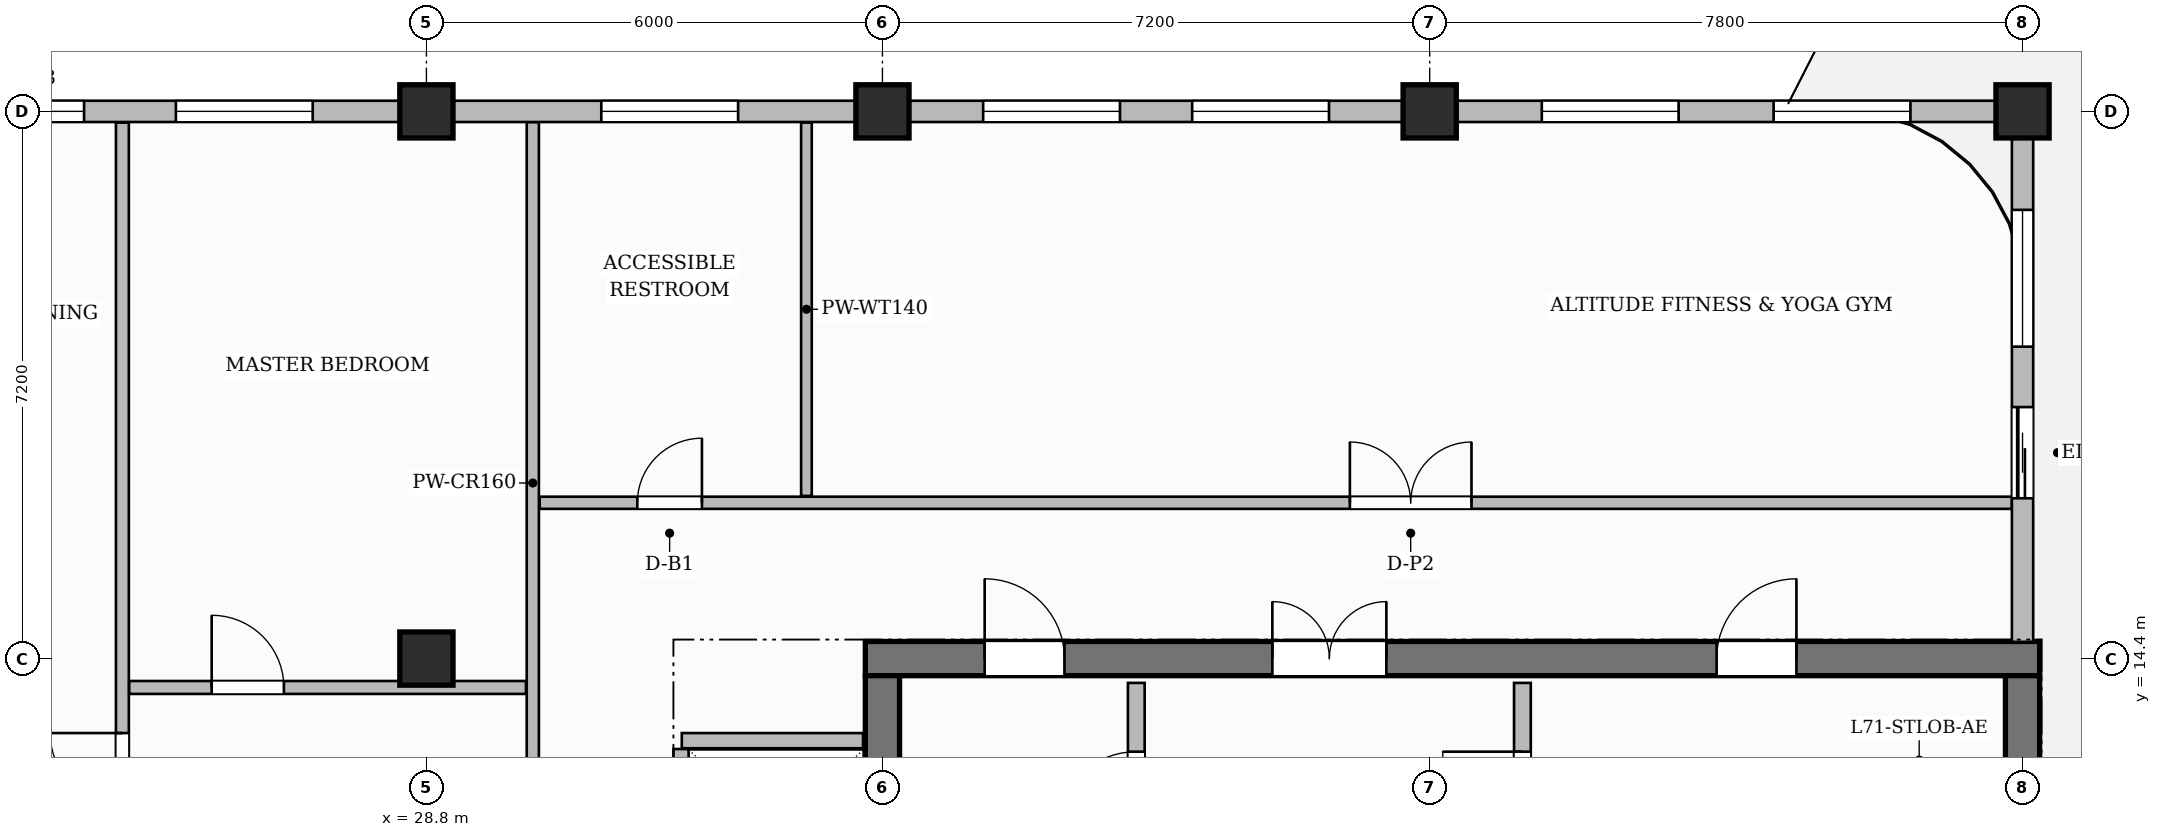
"""IFC4 building model, lengths in metres.
Left out: names, types, materials, properties, quantities, classifications, styles, units other than length and angle.
Written with IfcOpenShell. Run it as: python <this file> out.ifc"""

import sys

from ifc_helpers import new_model, si_unit, direction, frame, frame_2d, origin, origin_2d, place, context, subcontext, project, spatial, rectangle, extrude, source, transform, mapped, element, fill, save


model = new_model("IFC4")
c1 = context("Model", 3, precision=1e-05, world=origin(), true_north=direction((0.0, 1.0)))
c2 = subcontext(c1, "Body", "Model", "MODEL_VIEW")
j1 = project(units=[si_unit("LENGTHUNIT", "METRE"), si_unit("PLANEANGLEUNIT", "RADIAN")], contexts=[c1])
p1 = place(None, origin())
s1 = spatial("IfcSite", under=j1, at=p1, CompositionType="ELEMENT")
p2 = place(p1, origin())
s2 = spatial("IfcBuilding", under=s1, at=p2, CompositionType="ELEMENT")
p3 = place(p2, frame((0.0, 0.0, 282.75)))
s3 = spatial("IfcBuildingStorey", under=s2, at=p3, CompositionType="ELEMENT", Elevation=282.75)
p4 = place(p3, frame((34.575, 14.4, 0.0), z_axis=(0.0, 0.0, 1.0), x_axis=(1.0, 0.0, 0.0)))
e1 = element("IfcWall", 1, at=p4, inside=s3, PredefinedType="SHEAR", context=c2, shape_type="SweptSolid", body=[
    extrude(rectangle(XDim=15.45, YDim=0.45, at=frame_2d((7.725, 0.0))), origin(), (0.0, 0.0, 1.0), 3.85),
])
p5 = place(p4, frame((5.355, 0.0, 0.0)))
e2 = element("IfcOpeningElement", 2, at=p5, cuts=e1, PredefinedType="OPENING", context=c2, shape_type="SweptSolid", body=[
    extrude(rectangle(XDim=1.5, YDim=2.2, at=frame_2d((0.75, 1.1))), frame((0.0, 0.235, 0.0), z_axis=(0.0, -1.0, 0.0), x_axis=(1.0, 0.0, 0.0)), (0.0, 0.0, 1.0), 0.47),
])
p6 = place(p4, frame((1.57, 0.0, 0.0)))
e3 = element("IfcOpeningElement", 3, at=p6, cuts=e1, PredefinedType="OPENING", context=c2, shape_type="SweptSolid", body=[
    extrude(rectangle(XDim=1.05, YDim=2.15, at=frame_2d((0.525, 1.075))), frame((0.0, 0.235, 0.0), z_axis=(0.0, -1.0, 0.0), x_axis=(1.0, 0.0, 0.0)), (0.0, 0.0, 1.0), 0.47),
])
p7 = place(p4, frame((11.2, 0.0, 0.0)))
e4 = element("IfcOpeningElement", 4, at=p7, cuts=e1, PredefinedType="OPENING", context=c2, shape_type="SweptSolid", body=[
    extrude(rectangle(XDim=1.05, YDim=2.15, at=frame_2d((0.525, 1.075))), frame((0.0, 0.235, 0.0), z_axis=(0.0, -1.0, 0.0), x_axis=(1.0, 0.0, 0.0)), (0.0, 0.0, 1.0), 0.47),
])
for number, where, z_axis, x_axis in (
    (5, (34.8, 3.825, 0.0), (0.0, 0.0, 1.0), (0.0, 1.0, 0.0)),
    (6, (49.8, 3.825, 0.0), (0.0, 0.0, 1.0), (0.0, 1.0, 0.0)),
):
    element("IfcWall", number, at=place(p3, frame(where, z_axis=z_axis, x_axis=x_axis)), inside=s3, PredefinedType="SHEAR", context=c2, shape_type="SweptSolid", body=[
        extrude(rectangle(XDim=10.35, YDim=0.45, at=frame_2d((5.175, 0.0))), origin(), (0.0, 0.0, 1.0), 3.85),
    ])
m1 = source(origin(), c2, "Body", "SweptSolid", [
    extrude(rectangle(XDim=0.7, YDim=0.7, at=origin_2d()), origin(), (0.0, 0.0, 1.0), 3.85),
])
for number, where, z_axis, x_axis in (
    (7, (28.8, 14.4, 0.0), (0.0, 0.0, 1.0), (1.0, 0.0, 0.0)),
    (8, (28.8, 21.6, 0.0), (0.0, 0.0, 1.0), (1.0, 0.0, 0.0)),
    (9, (34.8, 21.6, 0.0), (0.0, 0.0, 1.0), (1.0, 0.0, 0.0)),
    (10, (42.0, 21.6, 0.0), (0.0, 0.0, 1.0), (1.0, 0.0, 0.0)),
    (11, (49.8, 21.6, 0.0), (0.0, 0.0, 1.0), (1.0, 0.0, 0.0)),
):
    element("IfcColumn", number, at=place(p3, frame(where, z_axis=z_axis, x_axis=x_axis)), inside=s3, PredefinedType="COLUMN", context=c2, shape_type="MappedRepresentation", body=[
        mapped(m1, transform((0.0, 0.0, 0.0), scale=1.0)),
    ])
p8 = place(p3, frame((38.14, 11.22, 0.0), z_axis=(0.0, 0.0, 1.0), x_axis=(0.0, 1.0, 0.0)))
e12 = element("IfcWall", 12, at=p8, inside=s3, PredefinedType="PARTITIONING", context=c2, shape_type="SweptSolid", body=[
    extrude(rectangle(XDim=2.86, YDim=0.22, at=frame_2d((1.43, 0.0))), origin(), (0.0, 0.0, 1.0), 3.6),
])
p9 = place(p8, frame((0.905, 0.0, 0.0)))
e13 = element("IfcOpeningElement", 13, at=p9, cuts=e12, PredefinedType="OPENING", context=c2, shape_type="SweptSolid", body=[
    extrude(rectangle(XDim=1.05, YDim=2.15, at=frame_2d((0.525, 1.075))), frame((0.0, 0.12, 0.0), z_axis=(0.0, -1.0, 0.0), x_axis=(1.0, 0.0, 0.0)), (0.0, 0.0, 1.0), 0.24),
])
p10 = place(p3, frame((43.22, 11.22, 0.0), z_axis=(0.0, 0.0, 1.0), x_axis=(0.0, 1.0, 0.0)))
e14 = element("IfcWall", 14, at=p10, inside=s3, PredefinedType="PARTITIONING", context=c2, shape_type="SweptSolid", body=[
    extrude(rectangle(XDim=2.86, YDim=0.22, at=frame_2d((1.43, 0.0))), origin(), (0.0, 0.0, 1.0), 3.6),
])
p11 = place(p10, frame((0.905, 0.0, 0.0)))
e15 = element("IfcOpeningElement", 15, at=p11, cuts=e14, PredefinedType="OPENING", context=c2, shape_type="SweptSolid", body=[
    extrude(rectangle(XDim=1.05, YDim=2.15, at=frame_2d((0.525, 1.075))), frame((0.0, 0.12, 0.0), z_axis=(0.0, -1.0, 0.0), x_axis=(1.0, 0.0, 0.0)), (0.0, 0.0, 1.0), 0.24),
])
p12 = place(p3, frame((32.16, 13.32, 0.0), z_axis=(0.0, 0.0, 1.0), x_axis=(1.0, 0.0, 0.0)))
e16 = element("IfcWall", 16, at=p12, inside=s3, PredefinedType="PARTITIONING", context=c2, shape_type="SweptSolid", body=[
    extrude(rectangle(XDim=2.385, YDim=0.2, at=frame_2d((1.192, 0.0))), origin(), (0.0, 0.0, 1.0), 3.6),
])
p13 = place(p3, frame((32.15, 4.39, 0.0), z_axis=(0.0, 0.0, 1.0), x_axis=(0.0, 1.0, 0.0)))
e17 = element("IfcWall", 17, at=p13, inside=s3, PredefinedType="PARTITIONING", context=c2, shape_type="SweptSolid", body=[
    extrude(rectangle(XDim=8.82, YDim=0.2, at=frame_2d((4.41, 0.0))), origin(), (0.0, 0.0, 1.0), 3.6),
])
p14 = place(p13, frame((0.5, 0.0, 0.0)))
e18 = element("IfcOpeningElement", 18, at=p14, cuts=e17, PredefinedType="OPENING", context=c2, shape_type="SweptSolid", body=[
    extrude(rectangle(XDim=1.1, YDim=2.2, at=frame_2d((0.55, 1.1))), frame((0.0, 0.11, 0.0), z_axis=(0.0, -1.0, 0.0), x_axis=(1.0, 0.0, 0.0)), (0.0, 0.0, 1.0), 0.22),
])
p15 = place(p13, frame((2.74, 0.0, 0.0)))
e19 = element("IfcOpeningElement", 19, at=p15, cuts=e17, PredefinedType="OPENING", context=c2, shape_type="SweptSolid", body=[
    extrude(rectangle(XDim=1.1, YDim=2.2, at=frame_2d((0.55, 1.1))), frame((0.0, 0.11, 0.0), z_axis=(0.0, -1.0, 0.0), x_axis=(1.0, 0.0, 0.0)), (0.0, 0.0, 1.0), 0.22),
])
p16 = place(p13, frame((4.98, 0.0, 0.0)))
e20 = element("IfcOpeningElement", 20, at=p16, cuts=e17, PredefinedType="OPENING", context=c2, shape_type="SweptSolid", body=[
    extrude(rectangle(XDim=1.1, YDim=2.2, at=frame_2d((0.55, 1.1))), frame((0.0, 0.11, 0.0), z_axis=(0.0, -1.0, 0.0), x_axis=(1.0, 0.0, 0.0)), (0.0, 0.0, 1.0), 0.22),
])
p17 = place(p13, frame((7.22, 0.0, 0.0)))
e21 = element("IfcOpeningElement", 21, at=p17, cuts=e17, PredefinedType="OPENING", context=c2, shape_type="SweptSolid", body=[
    extrude(rectangle(XDim=1.1, YDim=2.2, at=frame_2d((0.55, 1.1))), frame((0.0, 0.11, 0.0), z_axis=(0.0, -1.0, 0.0), x_axis=(1.0, 0.0, 0.0)), (0.0, 0.0, 1.0), 0.22),
])
p18 = place(p3, frame((30.2, 11.96, 0.0), z_axis=(0.0, 0.0, 1.0), x_axis=(0.0, 1.0, 0.0)))
e22 = element("IfcWall", 22, at=p18, inside=s3, PredefinedType="PARTITIONING", context=c2, shape_type="SweptSolid", body=[
    extrude(rectangle(XDim=9.5, YDim=0.16, at=frame_2d((4.75, 0.0))), origin(), (0.0, 0.0, 1.0), 3.6),
])
p19 = place(p3, frame((30.29, 16.45, 0.0), z_axis=(0.0, 0.0, 1.0), x_axis=(1.0, 0.0, 0.0)))
e23 = element("IfcWall", 23, at=p19, inside=s3, PredefinedType="PARTITIONING", context=c2, shape_type="SweptSolid", body=[
    extrude(rectangle(XDim=19.37, YDim=0.16, at=frame_2d((9.685, 0.0))), origin(), (0.0, 0.0, 1.0), 3.6),
])
p20 = place(p19, frame((1.285, 0.0, 0.0)))
e24 = element("IfcOpeningElement", 24, at=p20, cuts=e23, PredefinedType="OPENING", context=c2, shape_type="SweptSolid", body=[
    extrude(rectangle(XDim=0.85, YDim=2.1, at=frame_2d((0.425, 1.05))), frame((0.0, 0.09, 0.0), z_axis=(0.0, -1.0, 0.0), x_axis=(1.0, 0.0, 0.0)), (0.0, 0.0, 1.0), 0.18),
])
p21 = place(p19, frame((10.66, 0.0, 0.0)))
e25 = element("IfcOpeningElement", 25, at=p21, cuts=e23, PredefinedType="OPENING", context=c2, shape_type="SweptSolid", body=[
    extrude(rectangle(XDim=1.6, YDim=2.4, at=frame_2d((0.8, 1.2))), frame((0.0, 0.09, 0.0), z_axis=(0.0, -1.0, 0.0), x_axis=(1.0, 0.0, 0.0)), (0.0, 0.0, 1.0), 0.18),
])
p22 = place(p3, frame((33.8, 16.54, 0.0), z_axis=(0.0, 0.0, 1.0), x_axis=(0.0, 1.0, 0.0)))
e26 = element("IfcWall", 26, at=p22, inside=s3, PredefinedType="PARTITIONING", context=c2, shape_type="SweptSolid", body=[
    extrude(rectangle(XDim=4.912, YDim=0.14, at=frame_2d((2.456, 0.0))), origin(), (0.0, 0.0, 1.0), 3.6),
])
p23 = place(p3, frame((24.8, 11.96, 0.0), z_axis=(0.0, 0.0, 1.0), x_axis=(0.0, 1.0, 0.0)))
e27 = element("IfcWall", 27, at=p23, inside=s3, PredefinedType="PARTITIONING", context=c2, shape_type="SweptSolid", body=[
    extrude(rectangle(XDim=9.492, YDim=0.17, at=frame_2d((4.746, 0.0))), origin(), (0.0, 0.0, 1.0), 3.6),
])
p24 = place(p23, frame((0.51, 0.0, 0.0)))
e28 = element("IfcOpeningElement", 28, at=p24, cuts=e27, PredefinedType="OPENING", context=c2, shape_type="SweptSolid", body=[
    extrude(rectangle(XDim=0.95, YDim=2.15, at=frame_2d((0.475, 1.075))), frame((0.0, 0.095, 0.0), z_axis=(0.0, -1.0, 0.0), x_axis=(1.0, 0.0, 0.0)), (0.0, 0.0, 1.0), 0.19),
])
p25 = place(p3, frame((24.89, 14.02, 0.0), z_axis=(0.0, 0.0, 1.0), x_axis=(1.0, 0.0, 0.0)))
e29 = element("IfcWall", 29, at=p25, inside=s3, PredefinedType="PARTITIONING", context=c2, shape_type="SweptSolid", body=[
    extrude(rectangle(XDim=5.22, YDim=0.17, at=frame_2d((2.61, 0.0))), origin(), (0.0, 0.0, 1.0), 3.6),
])
p26 = place(p25, frame((1.085, 0.0, 0.0)))
e30 = element("IfcOpeningElement", 30, at=p26, cuts=e29, PredefinedType="OPENING", context=c2, shape_type="SweptSolid", body=[
    extrude(rectangle(XDim=0.95, YDim=2.15, at=frame_2d((0.475, 1.075))), frame((0.0, 0.095, 0.0), z_axis=(0.0, -1.0, 0.0), x_axis=(1.0, 0.0, 0.0)), (0.0, 0.0, 1.0), 0.19),
])
p27 = place(p3, frame((49.8, 14.62, 0.0), z_axis=(0.0, 0.0, 1.0), x_axis=(0.0, 1.0, 0.0)))
e31 = element("IfcWall", 31, at=p27, inside=s3, PredefinedType="SOLIDWALL", context=c2, shape_type="SweptSolid", body=[
    extrude(rectangle(XDim=6.93, YDim=0.28, at=frame_2d((3.465, 0.0))), origin(), (0.0, 0.0, 1.0), 3.185),
])
p28 = place(p27, frame((1.889, 0.0, 0.0)))
e32 = element("IfcOpeningElement", 32, at=p28, cuts=e31, PredefinedType="OPENING", context=c2, shape_type="SweptSolid", body=[
    extrude(rectangle(XDim=1.2, YDim=2.2, at=frame_2d((0.6, 1.1))), frame((0.0, 0.15, 0.0), z_axis=(0.0, -1.0, 0.0), x_axis=(1.0, 0.0, 0.0)), (0.0, 0.0, 1.0), 0.3),
])
p29 = place(p27, frame((3.884, 0.0, 0.8)))
e33 = element("IfcOpeningElement", 33, at=p29, cuts=e31, PredefinedType="OPENING", context=c2, shape_type="SweptSolid", body=[
    extrude(rectangle(XDim=1.8, YDim=1.85, at=frame_2d((0.9, 0.925))), frame((0.0, 0.15, 0.0), z_axis=(0.0, -1.0, 0.0), x_axis=(1.0, 0.0, 0.0)), (0.0, 0.0, 1.0), 0.3),
])
p30 = place(p3, frame((18.0, 21.6, 0.0), z_axis=(0.0, 0.0, 1.0), x_axis=(1.0, 0.0, 0.0)))
e34 = element("IfcWall", 34, at=p30, inside=s3, PredefinedType="SOLIDWALL", context=c2, shape_type="SweptSolid", body=[
    extrude(rectangle(XDim=31.8, YDim=0.28, at=frame_2d((15.9, 0.0))), origin(), (0.0, 0.0, 1.0), 3.185),
])
p31 = place(p30, frame((0.42, 0.0, 0.0)))
e35 = element("IfcOpeningElement", 35, at=p31, cuts=e34, PredefinedType="OPENING", context=c2, shape_type="SweptSolid", body=[
    extrude(rectangle(XDim=1.2, YDim=2.2, at=frame_2d((0.6, 1.1))), frame((0.0, 0.15, 0.0), z_axis=(0.0, -1.0, 0.0), x_axis=(1.0, 0.0, 0.0)), (0.0, 0.0, 1.0), 0.3),
])
p32 = place(p30, frame((4.896, 0.0, 0.8)))
e36 = element("IfcOpeningElement", 36, at=p32, cuts=e34, PredefinedType="OPENING", context=c2, shape_type="SweptSolid", body=[
    extrude(rectangle(XDim=1.4, YDim=1.85, at=frame_2d((0.7, 0.925))), frame((0.0, 0.15, 0.0), z_axis=(0.0, -1.0, 0.0), x_axis=(1.0, 0.0, 0.0)), (0.0, 0.0, 1.0), 0.3),
])
p33 = place(p30, frame((7.504, 0.0, 0.8)))
e37 = element("IfcOpeningElement", 37, at=p33, cuts=e34, PredefinedType="OPENING", context=c2, shape_type="SweptSolid", body=[
    extrude(rectangle(XDim=1.8, YDim=1.85, at=frame_2d((0.9, 0.925))), frame((0.0, 0.15, 0.0), z_axis=(0.0, -1.0, 0.0), x_axis=(1.0, 0.0, 0.0)), (0.0, 0.0, 1.0), 0.3),
])
p34 = place(p30, frame((13.101, 0.0, 0.8)))
e38 = element("IfcOpeningElement", 38, at=p34, cuts=e34, PredefinedType="OPENING", context=c2, shape_type="SweptSolid", body=[
    extrude(rectangle(XDim=1.8, YDim=1.85, at=frame_2d((0.9, 0.925))), frame((0.0, 0.15, 0.0), z_axis=(0.0, -1.0, 0.0), x_axis=(1.0, 0.0, 0.0)), (0.0, 0.0, 1.0), 0.3),
])
p35 = place(p30, frame((18.125, 0.0, 0.8)))
e39 = element("IfcOpeningElement", 39, at=p35, cuts=e34, PredefinedType="OPENING", context=c2, shape_type="SweptSolid", body=[
    extrude(rectangle(XDim=1.8, YDim=1.85, at=frame_2d((0.9, 0.925))), frame((0.0, 0.15, 0.0), z_axis=(0.0, -1.0, 0.0), x_axis=(1.0, 0.0, 0.0)), (0.0, 0.0, 1.0), 0.3),
])
p36 = place(p30, frame((20.875, 0.0, 0.8)))
e40 = element("IfcOpeningElement", 40, at=p36, cuts=e34, PredefinedType="OPENING", context=c2, shape_type="SweptSolid", body=[
    extrude(rectangle(XDim=1.8, YDim=1.85, at=frame_2d((0.9, 0.925))), frame((0.0, 0.15, 0.0), z_axis=(0.0, -1.0, 0.0), x_axis=(1.0, 0.0, 0.0)), (0.0, 0.0, 1.0), 0.3),
])
p37 = place(p30, frame((25.475, 0.0, 0.8)))
e41 = element("IfcOpeningElement", 41, at=p37, cuts=e34, PredefinedType="OPENING", context=c2, shape_type="SweptSolid", body=[
    extrude(rectangle(XDim=1.8, YDim=1.85, at=frame_2d((0.9, 0.925))), frame((0.0, 0.15, 0.0), z_axis=(0.0, -1.0, 0.0), x_axis=(1.0, 0.0, 0.0)), (0.0, 0.0, 1.0), 0.3),
])
p38 = place(p30, frame((28.525, 0.0, 0.8)))
e42 = element("IfcOpeningElement", 42, at=p38, cuts=e34, PredefinedType="OPENING", context=c2, shape_type="SweptSolid", body=[
    extrude(rectangle(XDim=1.8, YDim=1.85, at=frame_2d((0.9, 0.925))), frame((0.0, 0.15, 0.0), z_axis=(0.0, -1.0, 0.0), x_axis=(1.0, 0.0, 0.0)), (0.0, 0.0, 1.0), 0.3),
])
m2 = source(origin(), c2, "Body", "SweptSolid", [
    extrude(rectangle(XDim=1.05, YDim=2.15, at=frame_2d((0.525, 1.075))), frame((0.0, 0.025, 0.0), z_axis=(0.0, -1.0, 0.0), x_axis=(1.0, 0.0, 0.0)), (0.0, 0.0, 1.0), 0.05),
])
p39 = place(p9, origin())
e43 = element("IfcDoor", 43, at=p39, inside=s3, OperationType="SINGLE_SWING_LEFT", PredefinedType="DOOR", context=c2, shape_type="MappedRepresentation", body=[
    mapped(m2, transform((0.0, 0.0, 0.0), scale=1.0)),
])
fill(e13, e43)
p40 = place(p11, origin())
e44 = element("IfcDoor", 44, at=p40, inside=s3, OperationType="SINGLE_SWING_RIGHT", PredefinedType="DOOR", context=c2, shape_type="MappedRepresentation", body=[
    mapped(m2, transform((0.0, 0.0, 0.0), scale=1.0)),
])
fill(e15, e44)
m3 = source(origin(), c2, "Body", "SweptSolid", [
    extrude(rectangle(XDim=1.5, YDim=2.2, at=frame_2d((0.75, 1.1))), frame((0.0, 0.025, 0.0), z_axis=(0.0, -1.0, 0.0), x_axis=(1.0, 0.0, 0.0)), (0.0, 0.0, 1.0), 0.05),
])
p41 = place(p5, origin())
e45 = element("IfcDoor", 45, at=p41, inside=s3, OperationType="DOUBLE_DOOR_SINGLE_SWING", PredefinedType="DOOR", context=c2, shape_type="MappedRepresentation", body=[
    mapped(m3, transform((0.0, 0.0, 0.0), scale=1.0)),
])
fill(e2, e45)
p42 = place(p6, origin())
e46 = element("IfcDoor", 46, at=p42, inside=s3, OperationType="SINGLE_SWING_LEFT", PredefinedType="DOOR", context=c2, shape_type="MappedRepresentation", body=[
    mapped(m2, transform((0.0, 0.0, 0.0), scale=1.0)),
])
fill(e3, e46)
p43 = place(p7, origin())
e47 = element("IfcDoor", 47, at=p43, inside=s3, OperationType="SINGLE_SWING_RIGHT", PredefinedType="DOOR", context=c2, shape_type="MappedRepresentation", body=[
    mapped(m2, transform((0.0, 0.0, 0.0), scale=1.0)),
])
fill(e4, e47)
m4 = source(origin(), c2, "Body", "SweptSolid", [
    extrude(rectangle(XDim=0.85, YDim=2.1, at=frame_2d((0.425, 1.05))), frame((0.0, 0.025, 0.0), z_axis=(0.0, -1.0, 0.0), x_axis=(1.0, 0.0, 0.0)), (0.0, 0.0, 1.0), 0.05),
])
p44 = place(p20, origin())
e48 = element("IfcDoor", 48, at=p44, inside=s3, OperationType="SINGLE_SWING_RIGHT", PredefinedType="DOOR", context=c2, shape_type="MappedRepresentation", body=[
    mapped(m4, transform((0.0, 0.0, 0.0), scale=1.0)),
])
fill(e24, e48)
m5 = source(origin(), c2, "Body", "SweptSolid", [
    extrude(rectangle(XDim=1.6, YDim=2.4, at=frame_2d((0.8, 1.2))), frame((0.0, 0.025, 0.0), z_axis=(0.0, -1.0, 0.0), x_axis=(1.0, 0.0, 0.0)), (0.0, 0.0, 1.0), 0.05),
])
p45 = place(p21, origin())
e49 = element("IfcDoor", 49, at=p45, inside=s3, OperationType="DOUBLE_DOOR_SINGLE_SWING", PredefinedType="DOOR", context=c2, shape_type="MappedRepresentation", body=[
    mapped(m5, transform((0.0, 0.0, 0.0), scale=1.0)),
])
fill(e25, e49)
m6 = source(origin(), c2, "Body", "SweptSolid", [
    extrude(rectangle(XDim=0.95, YDim=2.15, at=frame_2d((0.475, 1.075))), frame((0.0, 0.025, 0.0), z_axis=(0.0, -1.0, 0.0), x_axis=(1.0, 0.0, 0.0)), (0.0, 0.0, 1.0), 0.05),
])
p46 = place(p24, origin())
e50 = element("IfcDoor", 50, at=p46, inside=s3, OperationType="SINGLE_SWING_RIGHT", PredefinedType="DOOR", context=c2, shape_type="MappedRepresentation", body=[
    mapped(m6, transform((0.0, 0.0, 0.0), scale=1.0)),
])
fill(e28, e50)
p47 = place(p26, origin())
e51 = element("IfcDoor", 51, at=p47, inside=s3, OperationType="SINGLE_SWING_LEFT", PredefinedType="DOOR", context=c2, shape_type="MappedRepresentation", body=[
    mapped(m6, transform((0.0, 0.0, 0.0), scale=1.0)),
])
fill(e30, e51)
m7 = source(origin(), c2, "Body", "SweptSolid", [
    extrude(rectangle(XDim=1.2, YDim=2.2, at=frame_2d((0.6, 1.1))), frame((0.0, 0.025, 0.0), z_axis=(0.0, -1.0, 0.0), x_axis=(1.0, 0.0, 0.0)), (0.0, 0.0, 1.0), 0.05),
])
p48 = place(p28, origin())
e52 = element("IfcDoor", 52, at=p48, inside=s3, OperationType="SLIDING_TO_LEFT", PredefinedType="DOOR", context=c2, shape_type="MappedRepresentation", body=[
    mapped(m7, transform((0.0, 0.0, 0.0), scale=1.0)),
])
fill(e32, e52)
m8 = source(origin(), c2, "Body", "SweptSolid", [
    extrude(rectangle(XDim=1.8, YDim=1.85, at=frame_2d((0.9, 0.925))), frame((0.0, 0.03, 0.0), z_axis=(0.0, -1.0, 0.0), x_axis=(1.0, 0.0, 0.0)), (0.0, 0.0, 1.0), 0.06),
])
p49 = place(p29, origin())
e53 = element("IfcWindow", 53, at=p49, inside=s3, PartitioningType="DOUBLE_PANEL_VERTICAL", PredefinedType="WINDOW", context=c2, shape_type="MappedRepresentation", body=[
    mapped(m8, transform((0.0, 0.0, 0.0), scale=1.0)),
])
fill(e33, e53)
m9 = source(origin(), c2, "Body", "SweptSolid", [
    extrude(rectangle(XDim=1.4, YDim=1.85, at=frame_2d((0.7, 0.925))), frame((0.0, 0.03, 0.0), z_axis=(0.0, -1.0, 0.0), x_axis=(1.0, 0.0, 0.0)), (0.0, 0.0, 1.0), 0.06),
])
p50 = place(p32, origin())
e54 = element("IfcWindow", 54, at=p50, inside=s3, PartitioningType="SINGLE_PANEL", PredefinedType="WINDOW", context=c2, shape_type="MappedRepresentation", body=[
    mapped(m9, transform((0.0, 0.0, 0.0), scale=1.0)),
])
fill(e36, e54)
p51 = place(p33, origin())
e55 = element("IfcWindow", 55, at=p51, inside=s3, PartitioningType="DOUBLE_PANEL_VERTICAL", PredefinedType="WINDOW", context=c2, shape_type="MappedRepresentation", body=[
    mapped(m8, transform((0.0, 0.0, 0.0), scale=1.0)),
])
fill(e37, e55)
p52 = place(p34, origin())
e56 = element("IfcWindow", 56, at=p52, inside=s3, PartitioningType="DOUBLE_PANEL_VERTICAL", PredefinedType="WINDOW", context=c2, shape_type="MappedRepresentation", body=[
    mapped(m8, transform((0.0, 0.0, 0.0), scale=1.0)),
])
fill(e38, e56)
p53 = place(p35, origin())
e57 = element("IfcWindow", 57, at=p53, inside=s3, PartitioningType="DOUBLE_PANEL_VERTICAL", PredefinedType="WINDOW", context=c2, shape_type="MappedRepresentation", body=[
    mapped(m8, transform((0.0, 0.0, 0.0), scale=1.0)),
])
fill(e39, e57)
p54 = place(p36, origin())
e58 = element("IfcWindow", 58, at=p54, inside=s3, PartitioningType="DOUBLE_PANEL_VERTICAL", PredefinedType="WINDOW", context=c2, shape_type="MappedRepresentation", body=[
    mapped(m8, transform((0.0, 0.0, 0.0), scale=1.0)),
])
fill(e40, e58)
p55 = place(p37, origin())
e59 = element("IfcWindow", 59, at=p55, inside=s3, PartitioningType="DOUBLE_PANEL_VERTICAL", PredefinedType="WINDOW", context=c2, shape_type="MappedRepresentation", body=[
    mapped(m8, transform((0.0, 0.0, 0.0), scale=1.0)),
])
fill(e41, e59)
p56 = place(p38, origin())
e60 = element("IfcWindow", 60, at=p56, inside=s3, PartitioningType="DOUBLE_PANEL_VERTICAL", PredefinedType="WINDOW", context=c2, shape_type="MappedRepresentation", body=[
    mapped(m8, transform((0.0, 0.0, 0.0), scale=1.0)),
])
fill(e42, e60)
save(model, sys.argv[1])
